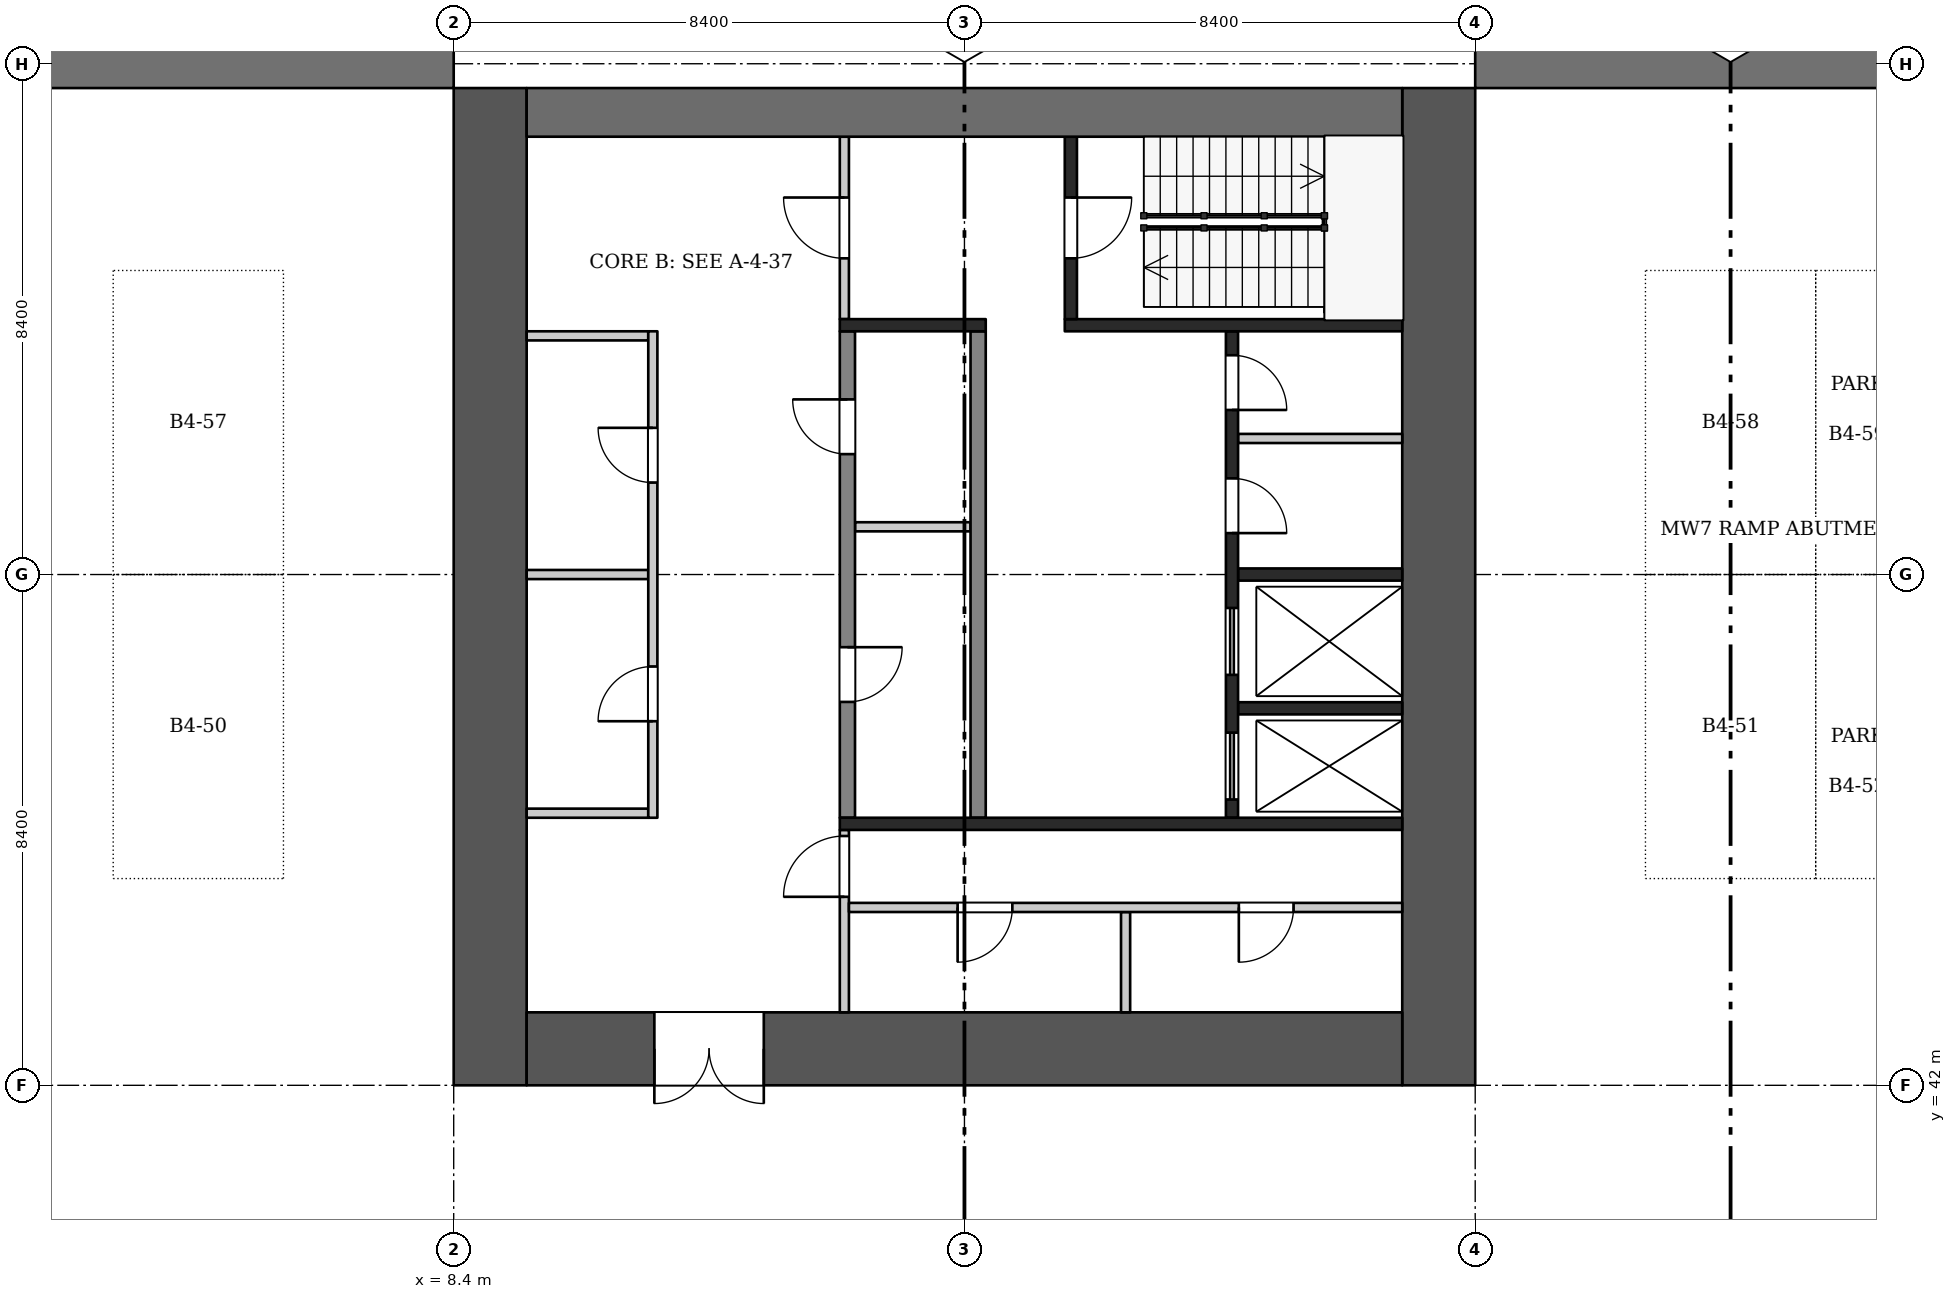
"""IFC4 building model, lengths in metres.
Left out: names, types, materials, properties, quantities, classifications, styles, units other than length and angle.
Written with IfcOpenShell. Run it as: python <this file> out.ifc"""

import sys

from ifc_helpers import new_model, si_unit, direction, frame, frame_2d, origin, place, context, subcontext, project, spatial, rectangle, extrude, element, fill, save


model = new_model("IFC4")
c1 = context("Model", 3, precision=1e-05, world=origin(), true_north=direction((0.0, 1.0)))
c2 = subcontext(c1, "Body", "Model", "MODEL_VIEW")
j1 = project(units=[si_unit("LENGTHUNIT", "METRE"), si_unit("PLANEANGLEUNIT", "RADIAN")], contexts=[c1])
p1 = place(None, origin())
s1 = spatial("IfcSite", under=j1, at=p1, CompositionType="ELEMENT")
p2 = place(p1, origin())
s2 = spatial("IfcBuilding", under=s1, at=p2, CompositionType="ELEMENT")
p3 = place(p2, frame((0.0, 0.0, -16.0)))
s3 = spatial("IfcBuildingStorey", under=s2, at=p3, CompositionType="ELEMENT", Elevation=-16.0)
p4 = place(p3, frame((25.2, 58.8, 0.0), z_axis=(0.0, 0.0, 1.0), x_axis=(1.0, 0.0, 0.0)))
e1 = element("IfcWall", 1, at=p4, inside=s3, PredefinedType="SOLIDWALL", context=c2, shape_type="SweptSolid", body=[
    extrude(rectangle(XDim=42.0, YDim=0.8, at=frame_2d((21.0, 0.0))), origin(), (0.0, 0.0, 1.0), 3.7),
])
p5 = place(p3, frame((-0.4, 58.8, 0.0), z_axis=(0.0, 0.0, 1.0), x_axis=(1.0, 0.0, 0.0)))
e2 = element("IfcWall", 2, at=p5, inside=s3, PredefinedType="SOLIDWALL", context=c2, shape_type="SweptSolid", body=[
    extrude(rectangle(XDim=8.8, YDim=0.8, at=frame_2d((4.4, 0.0))), origin(), (0.0, 0.0, 1.0), 3.7),
])
for number, where, z_axis, x_axis in (
    (3, (9.0, 58.4, 0.0), (0.0, 0.0, 1.0), (0.0, -1.0, 0.0)),
    (4, (24.6, 58.4, 0.0), (0.0, 0.0, 1.0), (0.0, -1.0, 0.0)),
):
    element("IfcWall", number, at=place(p3, frame(where, z_axis=z_axis, x_axis=x_axis)), inside=s3, PredefinedType="SHEAR", context=c2, shape_type="SweptSolid", body=[
        extrude(rectangle(XDim=16.4, YDim=1.2, at=frame_2d((8.2, 0.0))), origin(), (0.0, 0.0, 1.0), 3.7),
    ])
p6 = place(p3, frame((9.6, 58.0, 0.0), z_axis=(0.0, 0.0, 1.0), x_axis=(1.0, 0.0, 0.0)))
e5 = element("IfcWall", 5, at=p6, inside=s3, PredefinedType="SHEAR", context=c2, shape_type="SweptSolid", body=[
    extrude(rectangle(XDim=14.4, YDim=0.8, at=frame_2d((7.2, 0.0))), origin(), (0.0, 0.0, 1.0), 3.7),
])
p7 = place(p3, frame((9.6, 42.6, 0.0), z_axis=(0.0, 0.0, 1.0), x_axis=(1.0, 0.0, 0.0)))
e6 = element("IfcWall", 6, at=p7, inside=s3, PredefinedType="SHEAR", context=c2, shape_type="SweptSolid", body=[
    extrude(rectangle(XDim=14.4, YDim=1.2, at=frame_2d((7.2, 0.0))), origin(), (0.0, 0.0, 1.0), 3.7),
])
p8 = place(p7, frame((2.1, 0.0, 0.0)))
e7 = element("IfcOpeningElement", 7, at=p8, cuts=e6, PredefinedType="OPENING", context=c2, shape_type="SweptSolid", body=[
    extrude(rectangle(XDim=1.8, YDim=2.1, at=frame_2d((0.9, 1.05))), frame((0.0, 0.61, 0.0), z_axis=(0.0, -1.0, 0.0), x_axis=(1.0, 0.0, 0.0)), (0.0, 0.0, 1.0), 1.22),
])
for number, where, z_axis, x_axis in (
    (8, (9.6, 54.325, 0.0), (0.0, 0.0, 1.0), (1.0, 0.0, 0.0)),
    (9, (9.6, 46.475, 0.0), (0.0, 0.0, 1.0), (1.0, 0.0, 0.0)),
    (10, (9.6, 50.4, 0.0), (0.0, 0.0, 1.0), (1.0, 0.0, 0.0)),
):
    element("IfcWall", number, at=place(p3, frame(where, z_axis=z_axis, x_axis=x_axis)), inside=s3, PredefinedType="PARTITIONING", context=c2, shape_type="SweptSolid", body=[
        extrude(rectangle(XDim=2.0, YDim=0.15, at=frame_2d((1.0, 0.0))), origin(), (0.0, 0.0, 1.0), 3.7),
    ])
p9 = place(p3, frame((11.675, 54.4, 0.0), z_axis=(0.0, 0.0, 1.0), x_axis=(0.0, -1.0, 0.0)))
e11 = element("IfcWall", 11, at=p9, inside=s3, PredefinedType="PARTITIONING", context=c2, shape_type="SweptSolid", body=[
    extrude(rectangle(XDim=8.0, YDim=0.15, at=frame_2d((4.0, 0.0))), origin(), (0.0, 0.0, 1.0), 3.7),
])
p10 = place(p9, frame((1.587, 0.0, 0.0)))
e12 = element("IfcOpeningElement", 12, at=p10, cuts=e11, PredefinedType="OPENING", context=c2, shape_type="SweptSolid", body=[
    extrude(rectangle(XDim=0.9, YDim=2.1, at=frame_2d((0.45, 1.05))), frame((0.0, 0.085, 0.0), z_axis=(0.0, -1.0, 0.0), x_axis=(1.0, 0.0, 0.0)), (0.0, 0.0, 1.0), 0.17),
])
p11 = place(p9, frame((5.512, 0.0, 0.0)))
e13 = element("IfcOpeningElement", 13, at=p11, cuts=e11, PredefinedType="OPENING", context=c2, shape_type="SweptSolid", body=[
    extrude(rectangle(XDim=0.9, YDim=2.1, at=frame_2d((0.45, 1.05))), frame((0.0, 0.085, 0.0), z_axis=(0.0, -1.0, 0.0), x_axis=(1.0, 0.0, 0.0)), (0.0, 0.0, 1.0), 0.17),
])
p12 = place(p3, frame((15.0, 51.185, 0.0), z_axis=(0.0, 0.0, 1.0), x_axis=(1.0, 0.0, 0.0)))
e14 = element("IfcWall", 14, at=p12, inside=s3, PredefinedType="PARTITIONING", context=c2, shape_type="SweptSolid", body=[
    extrude(rectangle(XDim=1.9, YDim=0.15, at=frame_2d((0.95, 0.0))), origin(), (0.0, 0.0, 1.0), 3.7),
])
p13 = place(p3, frame((14.875, 54.4, 0.0), z_axis=(0.0, 0.0, 1.0), x_axis=(0.0, -1.0, 0.0)))
e15 = element("IfcWall", 15, at=p13, inside=s3, PredefinedType="SHEAR", context=c2, shape_type="SweptSolid", body=[
    extrude(rectangle(XDim=8.0, YDim=0.25, at=frame_2d((4.0, 0.0))), origin(), (0.0, 0.0, 1.0), 3.7),
])
p14 = place(p13, frame((1.12, 0.0, 0.0)))
e16 = element("IfcOpeningElement", 16, at=p14, cuts=e15, PredefinedType="OPENING", context=c2, shape_type="SweptSolid", body=[
    extrude(rectangle(XDim=0.9, YDim=2.1, at=frame_2d((0.45, 1.05))), frame((0.0, 0.135, 0.0), z_axis=(0.0, -1.0, 0.0), x_axis=(1.0, 0.0, 0.0)), (0.0, 0.0, 1.0), 0.27),
])
p15 = place(p13, frame((5.195, 0.0, 0.0)))
e17 = element("IfcOpeningElement", 17, at=p15, cuts=e15, PredefinedType="OPENING", context=c2, shape_type="SweptSolid", body=[
    extrude(rectangle(XDim=0.9, YDim=2.1, at=frame_2d((0.45, 1.05))), frame((0.0, 0.135, 0.0), z_axis=(0.0, -1.0, 0.0), x_axis=(1.0, 0.0, 0.0)), (0.0, 0.0, 1.0), 0.27),
])
p16 = place(p3, frame((17.025, 54.4, 0.0), z_axis=(0.0, 0.0, 1.0), x_axis=(0.0, -1.0, 0.0)))
e18 = element("IfcWall", 18, at=p16, inside=s3, PredefinedType="SHEAR", context=c2, shape_type="SweptSolid", body=[
    extrude(rectangle(XDim=8.0, YDim=0.25, at=frame_2d((4.0, 0.0))), origin(), (0.0, 0.0, 1.0), 3.7),
])
for number, where, z_axis, x_axis in (
    (19, (21.3, 50.4, 0.0), (0.0, 0.0, 1.0), (1.0, 0.0, 0.0)),
    (20, (21.3, 48.2, 0.0), (0.0, 0.0, 1.0), (1.0, 0.0, 0.0)),
):
    element("IfcWall", number, at=place(p3, frame(where, z_axis=z_axis, x_axis=x_axis)), inside=s3, PredefinedType="SHEAR", context=c2, shape_type="SweptSolid", body=[
        extrude(rectangle(XDim=2.7, YDim=0.2, at=frame_2d((1.35, 0.0))), origin(), (0.0, 0.0, 1.0), 3.7),
    ])
p17 = place(p3, frame((21.3, 52.637, 0.0), z_axis=(0.0, 0.0, 1.0), x_axis=(1.0, 0.0, 0.0)))
e21 = element("IfcWall", 21, at=p17, inside=s3, PredefinedType="PARTITIONING", context=c2, shape_type="SweptSolid", body=[
    extrude(rectangle(XDim=2.7, YDim=0.15, at=frame_2d((1.35, 0.0))), origin(), (0.0, 0.0, 1.0), 3.7),
])
p18 = place(p3, frame((21.2, 54.4, 0.0), z_axis=(0.0, 0.0, 1.0), x_axis=(0.0, -1.0, 0.0)))
e22 = element("IfcWall", 22, at=p18, inside=s3, PredefinedType="SHEAR", context=c2, shape_type="SweptSolid", body=[
    extrude(rectangle(XDim=8.0, YDim=0.2, at=frame_2d((4.0, 0.0))), origin(), (0.0, 0.0, 1.0), 3.7),
])
p19 = place(p18, frame((0.394, 0.0, 0.0)))
e23 = element("IfcOpeningElement", 23, at=p19, cuts=e22, PredefinedType="OPENING", context=c2, shape_type="SweptSolid", body=[
    extrude(rectangle(XDim=0.9, YDim=2.1, at=frame_2d((0.45, 1.05))), frame((0.0, 0.11, 0.0), z_axis=(0.0, -1.0, 0.0), x_axis=(1.0, 0.0, 0.0)), (0.0, 0.0, 1.0), 0.22),
])
p20 = place(p18, frame((2.419, 0.0, 0.0)))
e24 = element("IfcOpeningElement", 24, at=p20, cuts=e22, PredefinedType="OPENING", context=c2, shape_type="SweptSolid", body=[
    extrude(rectangle(XDim=0.9, YDim=2.1, at=frame_2d((0.45, 1.05))), frame((0.0, 0.11, 0.0), z_axis=(0.0, -1.0, 0.0), x_axis=(1.0, 0.0, 0.0)), (0.0, 0.0, 1.0), 0.22),
])
p21 = place(p18, frame((4.55, 0.0, 0.0)))
e25 = element("IfcOpeningElement", 25, at=p21, cuts=e22, PredefinedType="OPENING", context=c2, shape_type="SweptSolid", body=[
    extrude(rectangle(XDim=1.1, YDim=2.1, at=frame_2d((0.55, 1.05))), frame((0.0, 0.11, 0.0), z_axis=(0.0, -1.0, 0.0), x_axis=(1.0, 0.0, 0.0)), (0.0, 0.0, 1.0), 0.22),
])
p22 = place(p18, frame((6.6, 0.0, 0.0)))
e26 = element("IfcOpeningElement", 26, at=p22, cuts=e22, PredefinedType="OPENING", context=c2, shape_type="SweptSolid", body=[
    extrude(rectangle(XDim=1.1, YDim=2.1, at=frame_2d((0.55, 1.05))), frame((0.0, 0.11, 0.0), z_axis=(0.0, -1.0, 0.0), x_axis=(1.0, 0.0, 0.0)), (0.0, 0.0, 1.0), 0.22),
])
p23 = place(p3, frame((14.75, 54.5, 0.0), z_axis=(0.0, 0.0, 1.0), x_axis=(1.0, 0.0, 0.0)))
e27 = element("IfcWall", 27, at=p23, inside=s3, PredefinedType="SHEAR", context=c2, shape_type="SweptSolid", body=[
    extrude(rectangle(XDim=2.4, YDim=0.2, at=frame_2d((1.2, 0.0))), origin(), (0.0, 0.0, 1.0), 3.7),
])
p24 = place(p3, frame((18.45, 54.5, 0.0), z_axis=(0.0, 0.0, 1.0), x_axis=(1.0, 0.0, 0.0)))
e28 = element("IfcWall", 28, at=p24, inside=s3, PredefinedType="SHEAR", context=c2, shape_type="SweptSolid", body=[
    extrude(rectangle(XDim=5.55, YDim=0.2, at=frame_2d((2.775, 0.0))), origin(), (0.0, 0.0, 1.0), 3.7),
])
p25 = place(p3, frame((14.825, 57.6, 0.0), z_axis=(0.0, 0.0, 1.0), x_axis=(0.0, -1.0, 0.0)))
e29 = element("IfcWall", 29, at=p25, inside=s3, PredefinedType="PARTITIONING", context=c2, shape_type="SweptSolid", body=[
    extrude(rectangle(XDim=3.0, YDim=0.15, at=frame_2d((1.5, 0.0))), origin(), (0.0, 0.0, 1.0), 3.7),
])
p26 = place(p25, frame((1.0, 0.0, 0.0)))
e30 = element("IfcOpeningElement", 30, at=p26, cuts=e29, PredefinedType="OPENING", context=c2, shape_type="SweptSolid", body=[
    extrude(rectangle(XDim=1.0, YDim=2.1, at=frame_2d((0.5, 1.05))), frame((0.0, 0.085, 0.0), z_axis=(0.0, -1.0, 0.0), x_axis=(1.0, 0.0, 0.0)), (0.0, 0.0, 1.0), 0.17),
])
p27 = place(p3, frame((18.55, 57.6, 0.0), z_axis=(0.0, 0.0, 1.0), x_axis=(0.0, -1.0, 0.0)))
e31 = element("IfcWall", 31, at=p27, inside=s3, PredefinedType="SHEAR", context=c2, shape_type="SweptSolid", body=[
    extrude(rectangle(XDim=3.0, YDim=0.2, at=frame_2d((1.5, 0.0))), origin(), (0.0, 0.0, 1.0), 3.7),
])
p28 = place(p27, frame((1.0, 0.0, 0.0)))
e32 = element("IfcOpeningElement", 32, at=p28, cuts=e31, PredefinedType="OPENING", context=c2, shape_type="SweptSolid", body=[
    extrude(rectangle(XDim=1.0, YDim=2.1, at=frame_2d((0.5, 1.05))), frame((0.0, 0.11, 0.0), z_axis=(0.0, -1.0, 0.0), x_axis=(1.0, 0.0, 0.0)), (0.0, 0.0, 1.0), 0.22),
])
p29 = place(p3, frame((14.75, 46.3, 0.0), z_axis=(0.0, 0.0, 1.0), x_axis=(1.0, 0.0, 0.0)))
e33 = element("IfcWall", 33, at=p29, inside=s3, PredefinedType="SHEAR", context=c2, shape_type="SweptSolid", body=[
    extrude(rectangle(XDim=9.25, YDim=0.2, at=frame_2d((4.625, 0.0))), origin(), (0.0, 0.0, 1.0), 3.7),
])
p30 = place(p3, frame((14.825, 46.2, 0.0), z_axis=(0.0, 0.0, 1.0), x_axis=(0.0, -1.0, 0.0)))
e34 = element("IfcWall", 34, at=p30, inside=s3, PredefinedType="PARTITIONING", context=c2, shape_type="SweptSolid", body=[
    extrude(rectangle(XDim=3.0, YDim=0.15, at=frame_2d((1.5, 0.0))), origin(), (0.0, 0.0, 1.0), 3.7),
])
p31 = place(p30, frame((0.1, 0.0, 0.0)))
e35 = element("IfcOpeningElement", 35, at=p31, cuts=e34, PredefinedType="OPENING", context=c2, shape_type="SweptSolid", body=[
    extrude(rectangle(XDim=1.0, YDim=2.1, at=frame_2d((0.5, 1.05))), frame((0.0, 0.085, 0.0), z_axis=(0.0, -1.0, 0.0), x_axis=(1.0, 0.0, 0.0)), (0.0, 0.0, 1.0), 0.17),
])
p32 = place(p3, frame((19.45, 44.85, 0.0), z_axis=(0.0, 0.0, 1.0), x_axis=(0.0, -1.0, 0.0)))
e36 = element("IfcWall", 36, at=p32, inside=s3, PredefinedType="PARTITIONING", context=c2, shape_type="SweptSolid", body=[
    extrude(rectangle(XDim=1.65, YDim=0.15, at=frame_2d((0.825, 0.0))), origin(), (0.0, 0.0, 1.0), 3.7),
])
p33 = place(p3, frame((14.9, 44.925, 0.0), z_axis=(0.0, 0.0, 1.0), x_axis=(1.0, 0.0, 0.0)))
e37 = element("IfcWall", 37, at=p33, inside=s3, PredefinedType="PARTITIONING", context=c2, shape_type="SweptSolid", body=[
    extrude(rectangle(XDim=9.1, YDim=0.15, at=frame_2d((4.55, 0.0))), origin(), (0.0, 0.0, 1.0), 3.7),
])
p34 = place(p33, frame((1.788, 0.0, 0.0)))
e38 = element("IfcOpeningElement", 38, at=p34, cuts=e37, PredefinedType="OPENING", context=c2, shape_type="SweptSolid", body=[
    extrude(rectangle(XDim=0.9, YDim=2.1, at=frame_2d((0.45, 1.05))), frame((0.0, 0.085, 0.0), z_axis=(0.0, -1.0, 0.0), x_axis=(1.0, 0.0, 0.0)), (0.0, 0.0, 1.0), 0.17),
])
p35 = place(p33, frame((6.413, 0.0, 0.0)))
e39 = element("IfcOpeningElement", 39, at=p35, cuts=e37, PredefinedType="OPENING", context=c2, shape_type="SweptSolid", body=[
    extrude(rectangle(XDim=0.9, YDim=2.1, at=frame_2d((0.45, 1.05))), frame((0.0, 0.085, 0.0), z_axis=(0.0, -1.0, 0.0), x_axis=(1.0, 0.0, 0.0)), (0.0, 0.0, 1.0), 0.17),
])
p36 = place(p8, frame((1.8, 0.0, 0.0), z_axis=(0.0, 0.0, 1.0), x_axis=(-1.0, 0.0, 0.0)))
e40 = element("IfcDoor", 40, at=p36, inside=s3, OperationType="DOUBLE_DOOR_SINGLE_SWING", PredefinedType="DOOR", context=c2, shape_type="SweptSolid", body=[
    extrude(rectangle(XDim=1.8, YDim=2.1, at=frame_2d((0.9, 1.05))), frame((0.0, 0.025, 0.0), z_axis=(0.0, -1.0, 0.0), x_axis=(1.0, 0.0, 0.0)), (0.0, 0.0, 1.0), 0.05),
])
fill(e7, e40)
p37 = place(p10, frame((0.9, 0.0, 0.0), z_axis=(0.0, 0.0, 1.0), x_axis=(-1.0, 0.0, 0.0)))
e41 = element("IfcDoor", 41, at=p37, inside=s3, OperationType="SINGLE_SWING_RIGHT", PredefinedType="DOOR", context=c2, shape_type="SweptSolid", body=[
    extrude(rectangle(XDim=0.9, YDim=2.1, at=frame_2d((0.45, 1.05))), frame((0.0, 0.025, 0.0), z_axis=(0.0, -1.0, 0.0), x_axis=(1.0, 0.0, 0.0)), (0.0, 0.0, 1.0), 0.05),
])
fill(e12, e41)
p38 = place(p11, frame((0.9, 0.0, 0.0), z_axis=(0.0, 0.0, 1.0), x_axis=(-1.0, 0.0, 0.0)))
e42 = element("IfcDoor", 42, at=p38, inside=s3, OperationType="SINGLE_SWING_LEFT", PredefinedType="DOOR", context=c2, shape_type="SweptSolid", body=[
    extrude(rectangle(XDim=0.9, YDim=2.1, at=frame_2d((0.45, 1.05))), frame((0.0, 0.025, 0.0), z_axis=(0.0, -1.0, 0.0), x_axis=(1.0, 0.0, 0.0)), (0.0, 0.0, 1.0), 0.05),
])
fill(e13, e42)
p39 = place(p14, frame((0.9, 0.0, 0.0), z_axis=(0.0, 0.0, 1.0), x_axis=(-1.0, 0.0, 0.0)))
e43 = element("IfcDoor", 43, at=p39, inside=s3, OperationType="SINGLE_SWING_RIGHT", PredefinedType="DOOR", context=c2, shape_type="SweptSolid", body=[
    extrude(rectangle(XDim=0.9, YDim=2.1, at=frame_2d((0.45, 1.05))), frame((0.0, 0.025, 0.0), z_axis=(0.0, -1.0, 0.0), x_axis=(1.0, 0.0, 0.0)), (0.0, 0.0, 1.0), 0.05),
])
fill(e16, e43)
p40 = place(p15, origin())
e44 = element("IfcDoor", 44, at=p40, inside=s3, OperationType="SINGLE_SWING_LEFT", PredefinedType="DOOR", context=c2, shape_type="SweptSolid", body=[
    extrude(rectangle(XDim=0.9, YDim=2.1, at=frame_2d((0.45, 1.05))), frame((0.0, 0.025, 0.0), z_axis=(0.0, -1.0, 0.0), x_axis=(1.0, 0.0, 0.0)), (0.0, 0.0, 1.0), 0.05),
])
fill(e17, e44)
p41 = place(p19, origin())
e45 = element("IfcDoor", 45, at=p41, inside=s3, OperationType="SINGLE_SWING_RIGHT", PredefinedType="DOOR", context=c2, shape_type="SweptSolid", body=[
    extrude(rectangle(XDim=0.9, YDim=2.1, at=frame_2d((0.45, 1.05))), frame((0.0, 0.025, 0.0), z_axis=(0.0, -1.0, 0.0), x_axis=(1.0, 0.0, 0.0)), (0.0, 0.0, 1.0), 0.05),
])
fill(e23, e45)
p42 = place(p20, origin())
e46 = element("IfcDoor", 46, at=p42, inside=s3, OperationType="SINGLE_SWING_RIGHT", PredefinedType="DOOR", context=c2, shape_type="SweptSolid", body=[
    extrude(rectangle(XDim=0.9, YDim=2.1, at=frame_2d((0.45, 1.05))), frame((0.0, 0.025, 0.0), z_axis=(0.0, -1.0, 0.0), x_axis=(1.0, 0.0, 0.0)), (0.0, 0.0, 1.0), 0.05),
])
fill(e24, e46)
p43 = place(p21, origin())
e47 = element("IfcDoor", 47, at=p43, inside=s3, OperationType="DOUBLE_DOOR_SLIDING", PredefinedType="DOOR", context=c2, shape_type="SweptSolid", body=[
    extrude(rectangle(XDim=1.1, YDim=2.1, at=frame_2d((0.55, 1.05))), frame((0.0, 0.025, 0.0), z_axis=(0.0, -1.0, 0.0), x_axis=(1.0, 0.0, 0.0)), (0.0, 0.0, 1.0), 0.05),
])
fill(e25, e47)
p44 = place(p22, origin())
e48 = element("IfcDoor", 48, at=p44, inside=s3, OperationType="DOUBLE_DOOR_SLIDING", PredefinedType="DOOR", context=c2, shape_type="SweptSolid", body=[
    extrude(rectangle(XDim=1.1, YDim=2.1, at=frame_2d((0.55, 1.05))), frame((0.0, 0.025, 0.0), z_axis=(0.0, -1.0, 0.0), x_axis=(1.0, 0.0, 0.0)), (0.0, 0.0, 1.0), 0.05),
])
fill(e26, e48)
p45 = place(p26, frame((1.0, 0.0, 0.0), z_axis=(0.0, 0.0, 1.0), x_axis=(-1.0, 0.0, 0.0)))
e49 = element("IfcDoor", 49, at=p45, inside=s3, OperationType="SINGLE_SWING_RIGHT", PredefinedType="DOOR", context=c2, shape_type="SweptSolid", body=[
    extrude(rectangle(XDim=1.0, YDim=2.1, at=frame_2d((0.5, 1.05))), frame((0.0, 0.025, 0.0), z_axis=(0.0, -1.0, 0.0), x_axis=(1.0, 0.0, 0.0)), (0.0, 0.0, 1.0), 0.05),
])
fill(e30, e49)
p46 = place(p28, origin())
e50 = element("IfcDoor", 50, at=p46, inside=s3, OperationType="SINGLE_SWING_LEFT", PredefinedType="DOOR", context=c2, shape_type="SweptSolid", body=[
    extrude(rectangle(XDim=1.0, YDim=2.1, at=frame_2d((0.5, 1.05))), frame((0.0, 0.025, 0.0), z_axis=(0.0, -1.0, 0.0), x_axis=(1.0, 0.0, 0.0)), (0.0, 0.0, 1.0), 0.05),
])
fill(e32, e50)
p47 = place(p31, frame((1.0, 0.0, 0.0), z_axis=(0.0, 0.0, 1.0), x_axis=(-1.0, 0.0, 0.0)))
e51 = element("IfcDoor", 51, at=p47, inside=s3, OperationType="SINGLE_SWING_LEFT", PredefinedType="DOOR", context=c2, shape_type="SweptSolid", body=[
    extrude(rectangle(XDim=1.0, YDim=2.1, at=frame_2d((0.5, 1.05))), frame((0.0, 0.025, 0.0), z_axis=(0.0, -1.0, 0.0), x_axis=(1.0, 0.0, 0.0)), (0.0, 0.0, 1.0), 0.05),
])
fill(e35, e51)
p48 = place(p34, frame((0.9, 0.0, 0.0), z_axis=(0.0, 0.0, 1.0), x_axis=(-1.0, 0.0, 0.0)))
e52 = element("IfcDoor", 52, at=p48, inside=s3, OperationType="SINGLE_SWING_RIGHT", PredefinedType="DOOR", context=c2, shape_type="SweptSolid", body=[
    extrude(rectangle(XDim=0.9, YDim=2.1, at=frame_2d((0.45, 1.05))), frame((0.0, 0.025, 0.0), z_axis=(0.0, -1.0, 0.0), x_axis=(1.0, 0.0, 0.0)), (0.0, 0.0, 1.0), 0.05),
])
fill(e38, e52)
p49 = place(p35, frame((0.9, 0.0, 0.0), z_axis=(0.0, 0.0, 1.0), x_axis=(-1.0, 0.0, 0.0)))
e53 = element("IfcDoor", 53, at=p49, inside=s3, OperationType="SINGLE_SWING_RIGHT", PredefinedType="DOOR", context=c2, shape_type="SweptSolid", body=[
    extrude(rectangle(XDim=0.9, YDim=2.1, at=frame_2d((0.45, 1.05))), frame((0.0, 0.025, 0.0), z_axis=(0.0, -1.0, 0.0), x_axis=(1.0, 0.0, 0.0)), (0.0, 0.0, 1.0), 0.05),
])
fill(e39, e53)
save(model, sys.argv[1])
